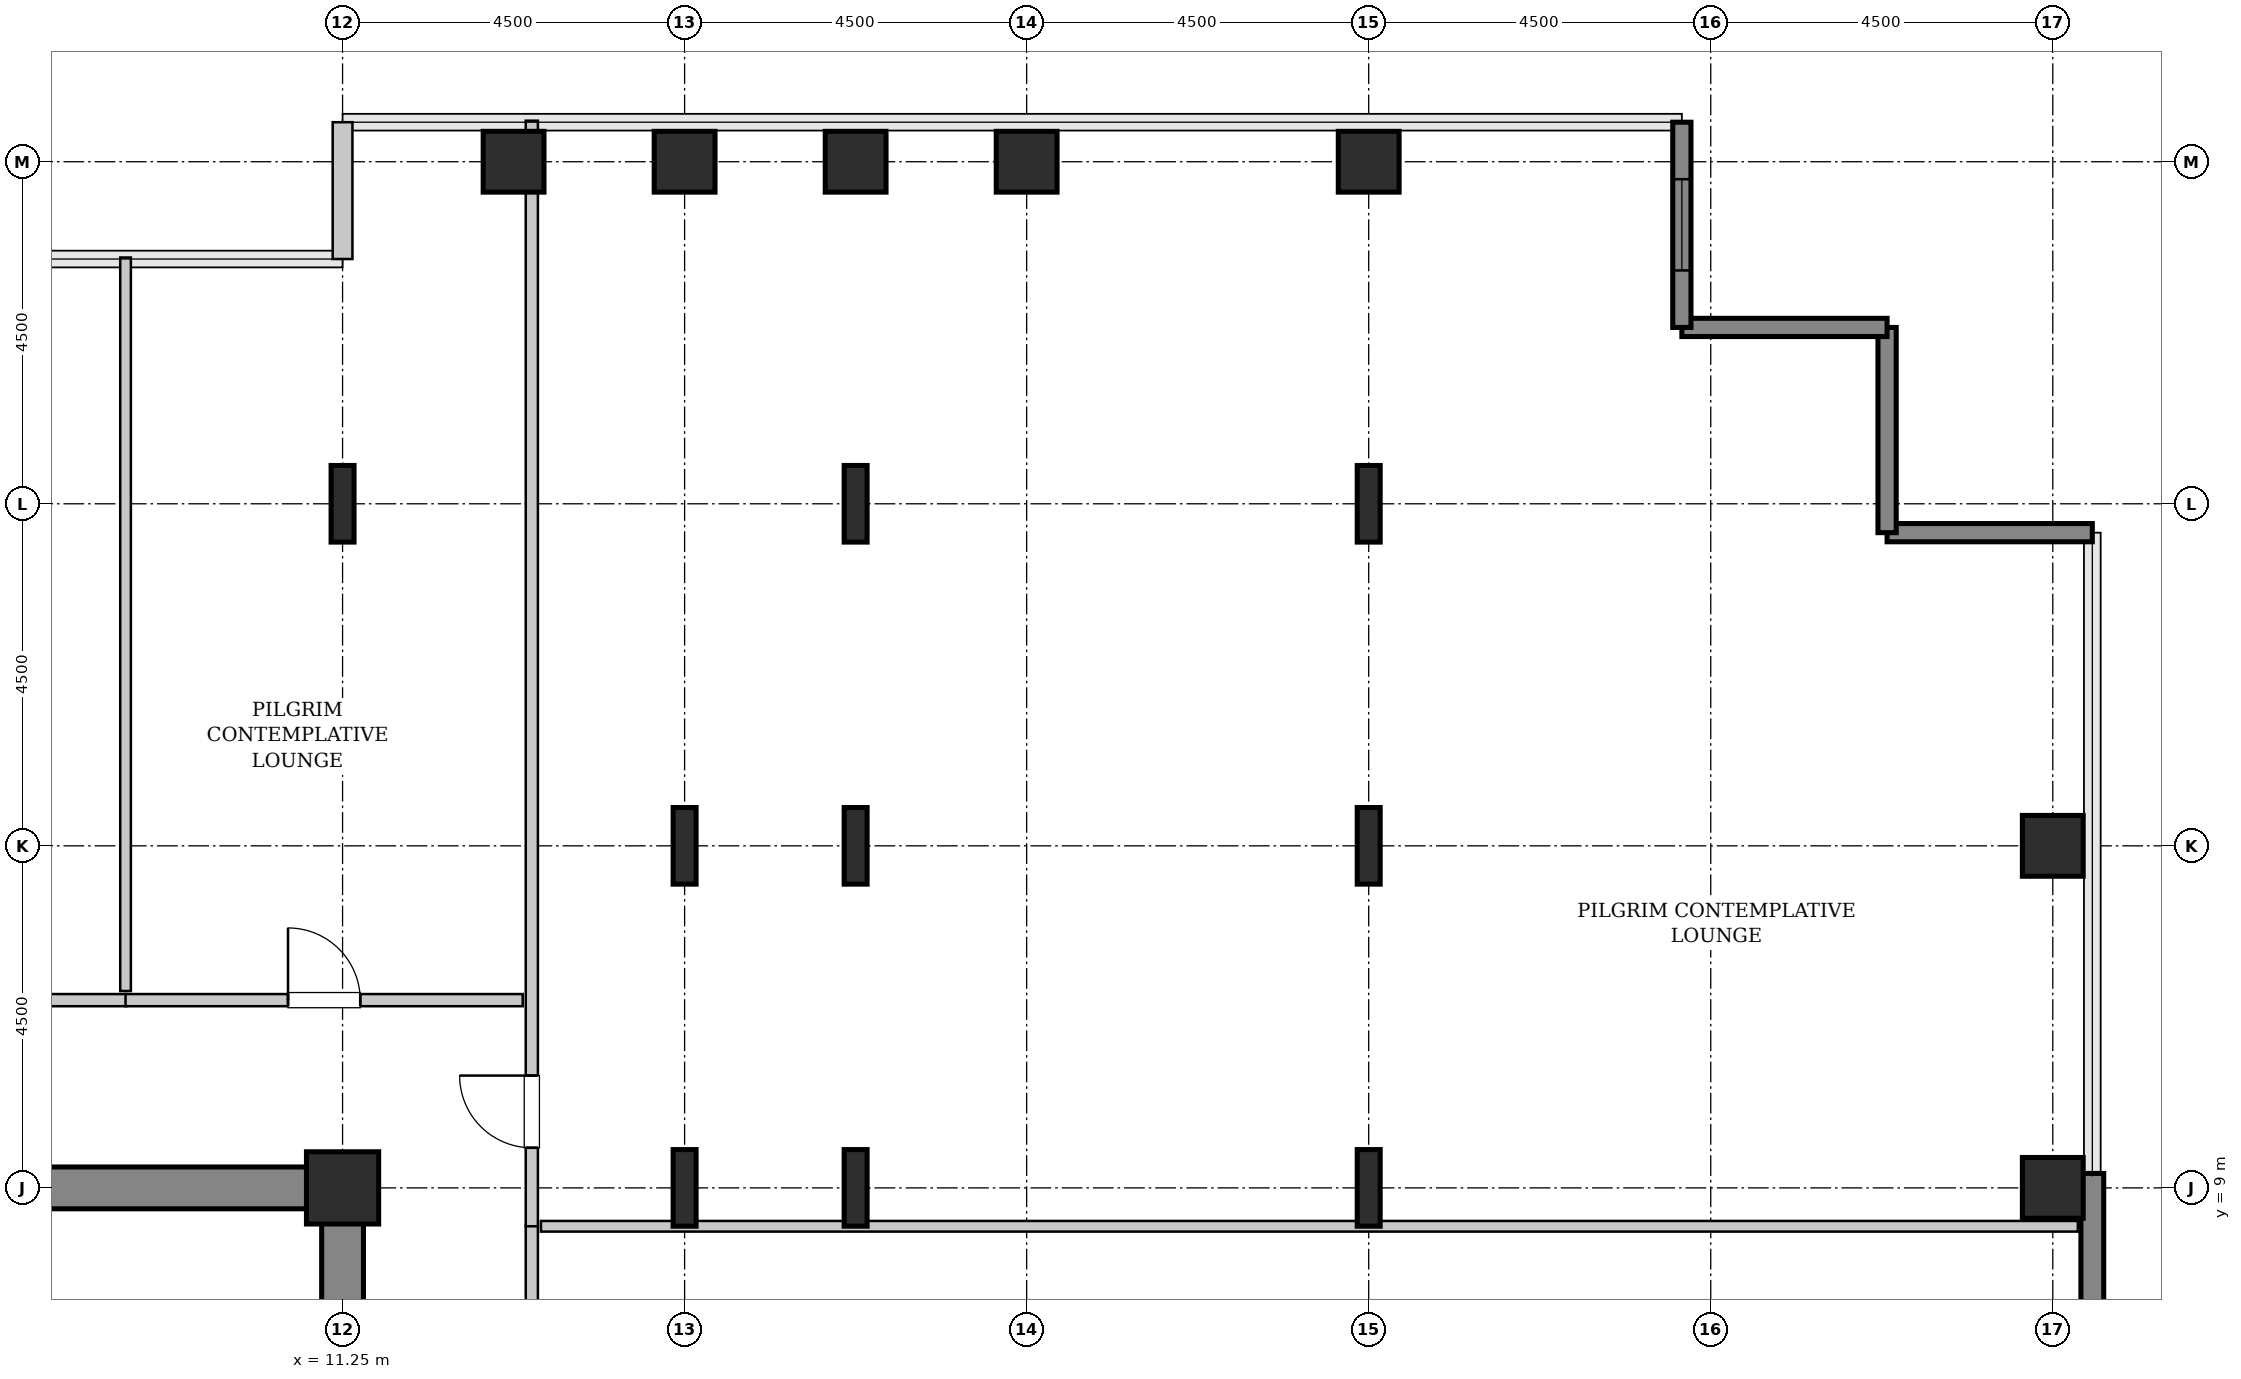
"""IFC4 building model, lengths in metres.
Left out: names, types, materials, properties, quantities, classifications, styles, units other than length and angle.
Written with IfcOpenShell. Run it as: python <this file> out.ifc"""

import sys

from ifc_helpers import new_model, si_unit, direction, frame, frame_2d, origin, origin_2d, place, context, subcontext, project, spatial, rectangle, hollow_rectangle, i_section, extrude, source, transform, mapped, element, fill, save


model = new_model("IFC4")
c1 = context("Model", 3, precision=1e-05, world=origin(), true_north=direction((0.0, 1.0)))
c2 = subcontext(c1, "Body", "Model", "MODEL_VIEW")
j1 = project(units=[si_unit("LENGTHUNIT", "METRE"), si_unit("PLANEANGLEUNIT", "RADIAN")], contexts=[c1])
p1 = place(None, origin())
s1 = spatial("IfcSite", under=j1, at=p1, CompositionType="ELEMENT")
p2 = place(p1, origin())
s2 = spatial("IfcBuilding", under=s1, at=p2, CompositionType="ELEMENT")
p3 = place(p2, frame((0.0, 0.0, 125.0)))
s3 = spatial("IfcBuildingStorey", under=s2, at=p3, CompositionType="ELEMENT", Elevation=125.0)
m1 = source(origin(), c2, "Body", "SweptSolid", [
    extrude(rectangle(XDim=9.975, YDim=0.55, at=frame_2d((4.987, 0.0))), origin(), (0.0, 0.0, 1.0), 3.8),
])
p4 = place(p3, frame((1.55, 9.0, 0.0), z_axis=(0.0, 0.0, 1.0), x_axis=(1.0, 0.0, 0.0)))
e1 = element("IfcWall", 1, at=p4, inside=s3, PredefinedType="SHEAR", context=c2, shape_type="MappedRepresentation", body=[
    mapped(m1, transform((0.0, 0.0, 0.0), x_axis=(1.0, 0.0, 0.0), y_axis=(0.0, 1.0, 0.0), z_axis=(0.0, 0.0, 1.0), scale=1.0)),
])
m2 = source(origin(), c2, "Body", "SweptSolid", [
    extrude(rectangle(XDim=7.375, YDim=0.55, at=frame_2d((3.688, 0.0))), origin(), (0.0, 0.0, 1.0), 3.8),
])
p5 = place(p3, frame((11.25, 1.35, 0.0), z_axis=(0.0, 0.0, 1.0), x_axis=(0.0, 1.0, 0.0)))
e2 = element("IfcWall", 2, at=p5, inside=s3, PredefinedType="SHEAR", context=c2, shape_type="MappedRepresentation", body=[
    mapped(m2, transform((0.0, 0.0, 0.0), x_axis=(1.0, 0.0, 0.0), y_axis=(0.0, 1.0, 0.0), z_axis=(0.0, 0.0, 1.0), scale=1.0)),
])
m3 = source(origin(), c2, "Body", "SweptSolid", [
    extrude(hollow_rectangle(XDim=0.95, YDim=0.95, WallThickness=0.045, InnerFilletRadius=0.045, OuterFilletRadius=0.09, at=origin_2d()), origin(), (0.0, 0.0, 1.0), 3.8),
])
p6 = place(p3, frame((11.25, 9.0, 0.0), z_axis=(0.0, 0.0, 1.0), x_axis=(1.0, 0.0, 0.0)))
e3 = element("IfcColumn", 3, at=p6, inside=s3, PredefinedType="COLUMN", context=c2, shape_type="MappedRepresentation", body=[
    mapped(m3, transform((0.0, 0.0, 0.0), x_axis=(1.0, 0.0, 0.0), y_axis=(0.0, 1.0, 0.0), z_axis=(0.0, 0.0, 1.0), scale=1.0)),
])
m4 = source(origin(), c2, "Body", "SweptSolid", [
    extrude(i_section(OverallWidth=0.302, OverallDepth=1.008, WebThickness=0.021, FlangeThickness=0.04, FilletRadius=0.03, at=origin_2d()), origin(), (0.0, 0.0, 1.0), 3.8),
])
p7 = place(p3, frame((11.25, 18.0, 0.0), z_axis=(0.0, 0.0, 1.0), x_axis=(1.0, 0.0, 0.0)))
e4 = element("IfcColumn", 4, at=p7, inside=s3, PredefinedType="COLUMN", context=c2, shape_type="MappedRepresentation", body=[
    mapped(m4, transform((0.0, 0.0, 0.0), x_axis=(1.0, 0.0, 0.0), y_axis=(0.0, 1.0, 0.0), z_axis=(0.0, 0.0, 1.0), scale=1.0)),
])
m5 = source(origin(), c2, "Body", "SweptSolid", [
    extrude(hollow_rectangle(XDim=0.8, YDim=0.8, WallThickness=0.04, InnerFilletRadius=0.04, OuterFilletRadius=0.08, at=origin_2d()), origin(), (0.0, 0.0, 1.0), 3.8),
])
p8 = place(p3, frame((13.5, 22.5, 0.0), z_axis=(0.0, 0.0, 1.0), x_axis=(1.0, 0.0, 0.0)))
e5 = element("IfcColumn", 5, at=p8, inside=s3, PredefinedType="COLUMN", context=c2, shape_type="MappedRepresentation", body=[
    mapped(m5, transform((0.0, 0.0, 0.0), x_axis=(1.0, 0.0, 0.0), y_axis=(0.0, 1.0, 0.0), z_axis=(0.0, 0.0, 1.0), scale=1.0)),
])
for number, where, z_axis, x_axis in (
    (6, (15.75, 9.0, 0.0), (0.0, 0.0, 1.0), (1.0, 0.0, 0.0)),
    (7, (15.75, 13.5, 0.0), (0.0, 0.0, 1.0), (1.0, 0.0, 0.0)),
):
    element("IfcColumn", number, at=place(p3, frame(where, z_axis=z_axis, x_axis=x_axis)), inside=s3, PredefinedType="COLUMN", context=c2, shape_type="MappedRepresentation", body=[
        mapped(m4, transform((0.0, 0.0, 0.0), x_axis=(1.0, 0.0, 0.0), y_axis=(0.0, 1.0, 0.0), z_axis=(0.0, 0.0, 1.0), scale=1.0)),
    ])
p9 = place(p3, frame((15.75, 22.5, 0.0), z_axis=(0.0, 0.0, 1.0), x_axis=(1.0, 0.0, 0.0)))
e8 = element("IfcColumn", 8, at=p9, inside=s3, PredefinedType="COLUMN", context=c2, shape_type="MappedRepresentation", body=[
    mapped(m5, transform((0.0, 0.0, 0.0), x_axis=(1.0, 0.0, 0.0), y_axis=(0.0, 1.0, 0.0), z_axis=(0.0, 0.0, 1.0), scale=1.0)),
])
for number, where, z_axis, x_axis in (
    (9, (18.0, 9.0, 0.0), (0.0, 0.0, 1.0), (1.0, 0.0, 0.0)),
    (10, (18.0, 13.5, 0.0), (0.0, 0.0, 1.0), (1.0, 0.0, 0.0)),
    (11, (18.0, 18.0, 0.0), (0.0, 0.0, 1.0), (1.0, 0.0, 0.0)),
):
    element("IfcColumn", number, at=place(p3, frame(where, z_axis=z_axis, x_axis=x_axis)), inside=s3, PredefinedType="COLUMN", context=c2, shape_type="MappedRepresentation", body=[
        mapped(m4, transform((0.0, 0.0, 0.0), x_axis=(1.0, 0.0, 0.0), y_axis=(0.0, 1.0, 0.0), z_axis=(0.0, 0.0, 1.0), scale=1.0)),
    ])
for number, where, z_axis, x_axis in (
    (12, (18.0, 22.5, 0.0), (0.0, 0.0, 1.0), (1.0, 0.0, 0.0)),
    (13, (20.25, 22.5, 0.0), (0.0, 0.0, 1.0), (1.0, 0.0, 0.0)),
):
    element("IfcColumn", number, at=place(p3, frame(where, z_axis=z_axis, x_axis=x_axis)), inside=s3, PredefinedType="COLUMN", context=c2, shape_type="MappedRepresentation", body=[
        mapped(m5, transform((0.0, 0.0, 0.0), x_axis=(1.0, 0.0, 0.0), y_axis=(0.0, 1.0, 0.0), z_axis=(0.0, 0.0, 1.0), scale=1.0)),
    ])
for number, where, z_axis, x_axis in (
    (14, (24.75, 9.0, 0.0), (0.0, 0.0, 1.0), (1.0, 0.0, 0.0)),
    (15, (24.75, 13.5, 0.0), (0.0, 0.0, 1.0), (1.0, 0.0, 0.0)),
    (16, (24.75, 18.0, 0.0), (0.0, 0.0, 1.0), (1.0, 0.0, 0.0)),
):
    element("IfcColumn", number, at=place(p3, frame(where, z_axis=z_axis, x_axis=x_axis)), inside=s3, PredefinedType="COLUMN", context=c2, shape_type="MappedRepresentation", body=[
        mapped(m4, transform((0.0, 0.0, 0.0), x_axis=(1.0, 0.0, 0.0), y_axis=(0.0, 1.0, 0.0), z_axis=(0.0, 0.0, 1.0), scale=1.0)),
    ])
for number, where, z_axis, x_axis in (
    (17, (24.75, 22.5, 0.0), (0.0, 0.0, 1.0), (1.0, 0.0, 0.0)),
    (18, (33.75, 9.0, 0.0), (0.0, 0.0, 1.0), (1.0, 0.0, 0.0)),
    (19, (33.75, 13.5, 0.0), (0.0, 0.0, 1.0), (1.0, 0.0, 0.0)),
):
    element("IfcColumn", number, at=place(p3, frame(where, z_axis=z_axis, x_axis=x_axis)), inside=s3, PredefinedType="COLUMN", context=c2, shape_type="MappedRepresentation", body=[
        mapped(m5, transform((0.0, 0.0, 0.0), x_axis=(1.0, 0.0, 0.0), y_axis=(0.0, 1.0, 0.0), z_axis=(0.0, 0.0, 1.0), scale=1.0)),
    ])
m6 = source(origin(), c2, "Body", "SweptSolid", [
    extrude(rectangle(XDim=4.88, YDim=0.3, at=frame_2d((2.44, 0.0))), origin(), (0.0, 0.0, 1.0), 3.55),
])
p10 = place(p3, frame((34.27, 4.31, 0.0), z_axis=(0.0, 0.0, 1.0), x_axis=(0.0, 1.0, 0.0)))
e20 = element("IfcWall", 20, at=p10, inside=s3, PredefinedType="SHEAR", context=c2, shape_type="MappedRepresentation", body=[
    mapped(m6, transform((0.0, 0.0, 0.0), x_axis=(1.0, 0.0, 0.0), y_axis=(0.0, 1.0, 0.0), z_axis=(0.0, 0.0, 1.0), scale=1.0)),
])
m7 = source(origin(), c2, "Body", "SweptSolid", [
    extrude(rectangle(XDim=2.7, YDim=0.24, at=frame_2d((1.35, 0.0))), origin(), (0.0, 0.0, 1.0), 3.55),
])
for number, where, z_axis, x_axis in (
    (21, (34.27, 17.62, 0.0), (0.0, 0.0, 1.0), (-1.0, 0.0, 0.0)),
    (22, (31.57, 17.62, 0.0), (0.0, 0.0, 1.0), (0.0, 1.0, 0.0)),
    (23, (31.57, 20.32, 0.0), (0.0, 0.0, 1.0), (-1.0, 0.0, 0.0)),
):
    element("IfcWall", number, at=place(p3, frame(where, z_axis=z_axis, x_axis=x_axis)), inside=s3, PredefinedType="SHEAR", context=c2, shape_type="MappedRepresentation", body=[
        mapped(m7, transform((0.0, 0.0, 0.0), x_axis=(1.0, 0.0, 0.0), y_axis=(0.0, 1.0, 0.0), z_axis=(0.0, 0.0, 1.0), scale=1.0)),
    ])
p11 = place(p3, frame((28.87, 20.32, 0.0), z_axis=(0.0, 0.0, 1.0), x_axis=(0.0, 1.0, 0.0)))
e24 = element("IfcWall", 24, at=p11, inside=s3, PredefinedType="SHEAR", context=c2, shape_type="MappedRepresentation", body=[
    mapped(m7, transform((0.0, 0.0, 0.0), x_axis=(1.0, 0.0, 0.0), y_axis=(0.0, 1.0, 0.0), z_axis=(0.0, 0.0, 1.0), scale=1.0)),
])
p12 = place(p11, frame((0.75, 0.0, 0.85)))
e25 = element("IfcOpeningElement", 25, at=p12, cuts=e24, PredefinedType="OPENING", context=c2, shape_type="SweptSolid", body=[
    extrude(rectangle(XDim=1.2, YDim=1.8, at=frame_2d((0.6, 0.9))), frame((0.0, 0.13, 0.0), z_axis=(0.0, -1.0, 0.0), x_axis=(1.0, 0.0, 0.0)), (0.0, 0.0, 1.0), 0.26),
])
m8 = source(origin(), c2, "Body", "SweptSolid", [
    extrude(rectangle(XDim=1.8, YDim=0.26, at=frame_2d((0.9, 0.0))), origin(), (0.0, 0.0, 1.0), 3.55),
])
p13 = place(p3, frame((11.25, 23.02, 0.0), z_axis=(0.0, 0.0, 1.0), x_axis=(0.0, -1.0, 0.0)))
e26 = element("IfcWall", 26, at=p13, inside=s3, PredefinedType="SOLIDWALL", context=c2, shape_type="MappedRepresentation", body=[
    mapped(m8, transform((0.0, 0.0, 0.0), x_axis=(1.0, 0.0, 0.0), y_axis=(0.0, 1.0, 0.0), z_axis=(0.0, 0.0, 1.0), scale=1.0)),
])
m9 = source(origin(), c2, "Body", "SweptSolid", [
    extrude(rectangle(XDim=3.11, YDim=0.16, at=frame_2d((1.555, 0.0))), origin(), (0.0, 0.0, 1.0), 3.535),
])
p14 = place(p3, frame((13.74, 5.395, 0.0), z_axis=(0.0, 0.0, 1.0), x_axis=(0.0, 1.0, 0.0)))
e27 = element("IfcWall", 27, at=p14, inside=s3, PredefinedType="PARTITIONING", context=c2, shape_type="MappedRepresentation", body=[
    mapped(m9, transform((0.0, 0.0, 0.0), x_axis=(1.0, 0.0, 0.0), y_axis=(0.0, 1.0, 0.0), z_axis=(0.0, 0.0, 1.0), scale=1.0)),
])
p15 = place(p14, frame((1.08, 0.0, 0.0)))
e28 = element("IfcOpeningElement", 28, at=p15, cuts=e27, PredefinedType="OPENING", context=c2, shape_type="SweptSolid", body=[
    extrude(rectangle(XDim=0.95, YDim=2.1, at=frame_2d((0.475, 1.05))), frame((0.0, 0.09, 0.0), z_axis=(0.0, -1.0, 0.0), x_axis=(1.0, 0.0, 0.0)), (0.0, 0.0, 1.0), 0.18),
])
m10 = source(origin(), c2, "Body", "SweptSolid", [
    extrude(rectangle(XDim=20.22, YDim=0.14, at=frame_2d((10.11, 0.0))), origin(), (0.0, 0.0, 1.0), 2.875),
])
p16 = place(p3, frame((13.86, 8.495, 0.0), z_axis=(0.0, 0.0, 1.0), x_axis=(1.0, 0.0, 0.0)))
e29 = element("IfcWall", 29, at=p16, inside=s3, PredefinedType="PARTITIONING", context=c2, shape_type="MappedRepresentation", body=[
    mapped(m10, transform((0.0, 0.0, 0.0), x_axis=(1.0, 0.0, 0.0), y_axis=(0.0, 1.0, 0.0), z_axis=(0.0, 0.0, 1.0), scale=1.0)),
])
m11 = source(origin(), c2, "Body", "SweptSolid", [
    extrude(rectangle(XDim=14.545, YDim=0.16, at=frame_2d((7.272, 0.0))), origin(), (0.0, 0.0, 1.0), 3.535),
])
p17 = place(p3, frame((13.74, 8.495, 0.0), z_axis=(0.0, 0.0, 1.0), x_axis=(0.0, 1.0, 0.0)))
e30 = element("IfcWall", 30, at=p17, inside=s3, PredefinedType="PARTITIONING", context=c2, shape_type="MappedRepresentation", body=[
    mapped(m11, transform((0.0, 0.0, 0.0), x_axis=(1.0, 0.0, 0.0), y_axis=(0.0, 1.0, 0.0), z_axis=(0.0, 0.0, 1.0), scale=1.0)),
])
p18 = place(p17, frame((1.032, 0.0, 0.0)))
e31 = element("IfcOpeningElement", 31, at=p18, cuts=e30, PredefinedType="OPENING", context=c2, shape_type="SweptSolid", body=[
    extrude(rectangle(XDim=0.95, YDim=2.1, at=frame_2d((0.475, 1.05))), frame((0.0, 0.09, 0.0), z_axis=(0.0, -1.0, 0.0), x_axis=(1.0, 0.0, 0.0)), (0.0, 0.0, 1.0), 0.18),
])
m12 = source(origin(), c2, "Body", "SweptSolid", [
    extrude(rectangle(XDim=6.21, YDim=0.16, at=frame_2d((3.105, 0.0))), origin(), (0.0, 0.0, 1.0), 3.535),
])
p19 = place(p3, frame((2.195, 11.47, 0.0), z_axis=(0.0, 0.0, 1.0), x_axis=(1.0, 0.0, 0.0)))
e32 = element("IfcWall", 32, at=p19, inside=s3, PredefinedType="PARTITIONING", context=c2, shape_type="MappedRepresentation", body=[
    mapped(m12, transform((0.0, 0.0, 0.0), x_axis=(1.0, 0.0, 0.0), y_axis=(0.0, 1.0, 0.0), z_axis=(0.0, 0.0, 1.0), scale=1.0)),
])
p20 = place(p19, frame((2.63, 0.0, 0.0)))
e33 = element("IfcOpeningElement", 33, at=p20, cuts=e32, PredefinedType="OPENING", context=c2, shape_type="SweptSolid", body=[
    extrude(rectangle(XDim=0.95, YDim=2.1, at=frame_2d((0.475, 1.05))), frame((0.0, 0.09, 0.0), z_axis=(0.0, -1.0, 0.0), x_axis=(1.0, 0.0, 0.0)), (0.0, 0.0, 1.0), 0.18),
])
m13 = source(origin(), c2, "Body", "SweptSolid", [
    extrude(rectangle(XDim=9.65, YDim=0.14, at=frame_2d((4.825, 0.0))), origin(), (0.0, 0.0, 1.0), 3.535),
])
p21 = place(p3, frame((8.395, 11.59, 0.0), z_axis=(0.0, 0.0, 1.0), x_axis=(0.0, 1.0, 0.0)))
e34 = element("IfcWall", 34, at=p21, inside=s3, PredefinedType="PARTITIONING", context=c2, shape_type="MappedRepresentation", body=[
    mapped(m13, transform((0.0, 0.0, 0.0), x_axis=(1.0, 0.0, 0.0), y_axis=(0.0, 1.0, 0.0), z_axis=(0.0, 0.0, 1.0), scale=1.0)),
])
m14 = source(origin(), c2, "Body", "SweptSolid", [
    extrude(rectangle(XDim=5.225, YDim=0.16, at=frame_2d((2.613, 0.0))), origin(), (0.0, 0.0, 1.0), 3.535),
])
p22 = place(p3, frame((8.395, 11.47, 0.0), z_axis=(0.0, 0.0, 1.0), x_axis=(1.0, 0.0, 0.0)))
e35 = element("IfcWall", 35, at=p22, inside=s3, PredefinedType="PARTITIONING", context=c2, shape_type="MappedRepresentation", body=[
    mapped(m14, transform((0.0, 0.0, 0.0), x_axis=(1.0, 0.0, 0.0), y_axis=(0.0, 1.0, 0.0), z_axis=(0.0, 0.0, 1.0), scale=1.0)),
])
p23 = place(p22, frame((2.137, 0.0, 0.0)))
e36 = element("IfcOpeningElement", 36, at=p23, cuts=e35, PredefinedType="OPENING", context=c2, shape_type="SweptSolid", body=[
    extrude(rectangle(XDim=0.95, YDim=2.1, at=frame_2d((0.475, 1.05))), frame((0.0, 0.09, 0.0), z_axis=(0.0, -1.0, 0.0), x_axis=(1.0, 0.0, 0.0)), (0.0, 0.0, 1.0), 0.18),
])
m15 = source(origin(), c2, "Body", "SweptSolid", [
    extrude(rectangle(XDim=1.2, YDim=1.8, at=frame_2d((0.6, 0.9))), frame((0.0, 0.03, 0.0), z_axis=(0.0, -1.0, 0.0), x_axis=(1.0, 0.0, 0.0)), (0.0, 0.0, 1.0), 0.06),
])
p24 = place(p12, origin())
e37 = element("IfcWindow", 37, at=p24, inside=s3, PartitioningType="SINGLE_PANEL", PredefinedType="WINDOW", context=c2, shape_type="MappedRepresentation", body=[
    mapped(m15, transform((0.0, 0.0, 0.0), x_axis=(1.0, 0.0, 0.0), y_axis=(0.0, 1.0, 0.0), z_axis=(0.0, 0.0, 1.0), scale=1.0)),
])
fill(e25, e37)
m16 = source(origin(), c2, "Body", "SweptSolid", [
    extrude(rectangle(XDim=0.95, YDim=2.1, at=frame_2d((0.475, 1.05))), frame((0.0, 0.025, 0.0), z_axis=(0.0, -1.0, 0.0), x_axis=(1.0, 0.0, 0.0)), (0.0, 0.0, 1.0), 0.05),
])
p25 = place(p18, origin())
e38 = element("IfcDoor", 38, at=p25, inside=s3, OperationType="SINGLE_SWING_RIGHT", PredefinedType="DOOR", context=c2, shape_type="MappedRepresentation", body=[
    mapped(m16, transform((0.0, 0.0, 0.0), x_axis=(1.0, 0.0, 0.0), y_axis=(0.0, 1.0, 0.0), z_axis=(0.0, 0.0, 1.0), scale=1.0)),
])
fill(e31, e38)
p26 = place(p23, origin())
e39 = element("IfcDoor", 39, at=p26, inside=s3, OperationType="SINGLE_SWING_LEFT", PredefinedType="DOOR", context=c2, shape_type="MappedRepresentation", body=[
    mapped(m16, transform((0.0, 0.0, 0.0), x_axis=(1.0, 0.0, 0.0), y_axis=(0.0, 1.0, 0.0), z_axis=(0.0, 0.0, 1.0), scale=1.0)),
])
fill(e36, e39)
save(model, sys.argv[1])
